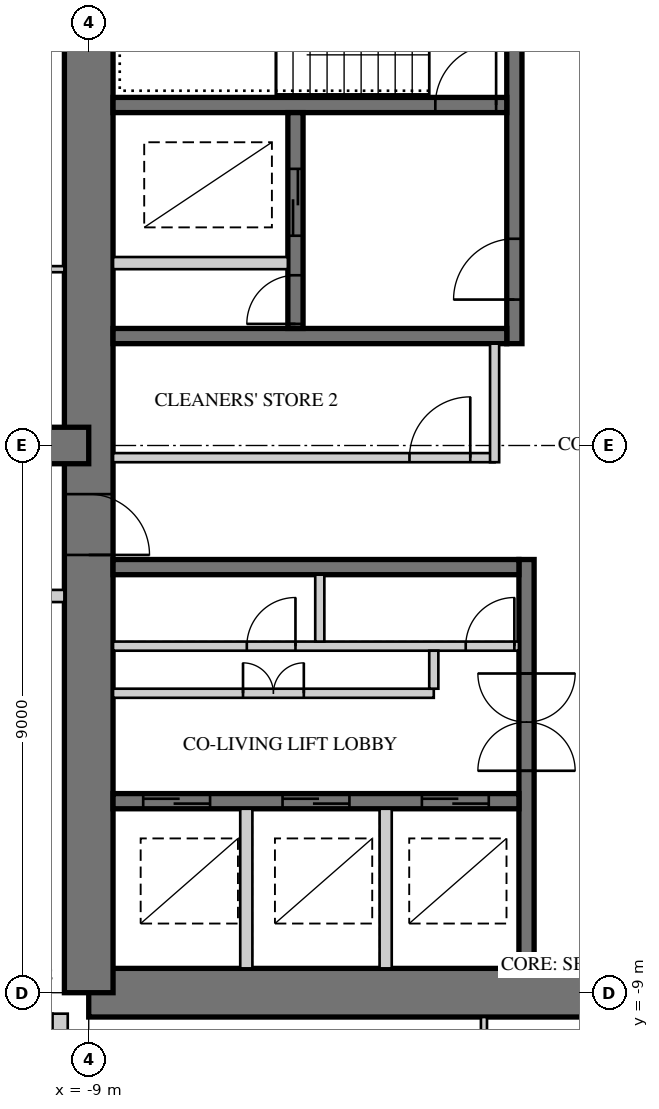
"""IFC4 building model, lengths in metres.
Left out: names, types, materials, properties, quantities, classifications, styles, units other than length and angle.
Written with IfcOpenShell. Run it as: python <this file> out.ifc"""

import sys

from ifc_helpers import new_model, si_unit, direction, frame, frame_2d, origin, place, context, subcontext, project, spatial, rectangle, extrude, element, fill, save


model = new_model("IFC4")
c1 = context("Model", 3, precision=1e-05, world=origin(), true_north=direction((0.0, 1.0)))
c2 = subcontext(c1, "Body", "Model", "MODEL_VIEW")
j1 = project(units=[si_unit("LENGTHUNIT", "METRE"), si_unit("PLANEANGLEUNIT", "RADIAN")], contexts=[c1])
p1 = place(None, origin())
s1 = spatial("IfcSite", under=j1, at=p1, CompositionType="ELEMENT")
p2 = place(p1, origin())
s2 = spatial("IfcBuilding", under=s1, at=p2, CompositionType="ELEMENT")
p3 = place(p2, frame((0.0, 0.0, 284.9)))
s3 = spatial("IfcBuildingStorey", under=s2, at=p3, CompositionType="ELEMENT", Elevation=284.9)
p4 = place(p3, frame((-9.0, -9.0, 0.0), z_axis=(0.0, 0.0, 1.0), x_axis=(1.0, 0.0, 0.0)))
e1 = element("IfcWall", 1, at=p4, inside=s3, PredefinedType="SHEAR", context=c2, shape_type="SweptSolid", body=[
    extrude(rectangle(XDim=18.0, YDim=0.8, at=frame_2d((9.0, 0.0))), origin(), (0.0, 0.0, 1.0), 3.4),
])
p5 = place(p4, frame((9.8, 0.0, 0.0)))
e2 = element("IfcOpeningElement", 2, at=p5, cuts=e1, PredefinedType="OPENING", context=c2, shape_type="SweptSolid", body=[
    extrude(rectangle(XDim=1.0, YDim=2.4, at=frame_2d((0.5, 1.2))), frame((0.0, 0.41, 0.0), z_axis=(0.0, -1.0, 0.0), x_axis=(1.0, 0.0, 0.0)), (0.0, 0.0, 1.0), 0.82),
])
p6 = place(p3, frame((-9.0, 9.0, 0.0), z_axis=(0.0, 0.0, 1.0), x_axis=(0.0, -1.0, 0.0)))
e3 = element("IfcWall", 3, at=p6, inside=s3, PredefinedType="SHEAR", context=c2, shape_type="SweptSolid", body=[
    extrude(rectangle(XDim=18.0, YDim=0.8, at=frame_2d((9.0, 0.0))), origin(), (0.0, 0.0, 1.0), 3.4),
])
p7 = place(p6, frame((9.8, 0.0, 0.0)))
e4 = element("IfcOpeningElement", 4, at=p7, cuts=e3, PredefinedType="OPENING", context=c2, shape_type="SweptSolid", body=[
    extrude(rectangle(XDim=1.0, YDim=2.4, at=frame_2d((0.5, 1.2))), frame((0.0, 0.41, 0.0), z_axis=(0.0, -1.0, 0.0), x_axis=(1.0, 0.0, 0.0)), (0.0, 0.0, 1.0), 0.82),
])
p8 = place(p3, frame((-2.0, 1.675, 0.0), z_axis=(0.0, 0.0, 1.0), x_axis=(0.0, 1.0, 0.0)))
e5 = element("IfcWall", 5, at=p8, inside=s3, PredefinedType="SHEAR", context=c2, shape_type="SweptSolid", body=[
    extrude(rectangle(XDim=6.925, YDim=0.25, at=frame_2d((3.462, 0.0))), origin(), (0.0, 0.0, 1.0), 3.4),
])
p9 = place(p8, frame((0.725, 0.0, 0.0)))
e6 = element("IfcOpeningElement", 6, at=p9, cuts=e5, PredefinedType="OPENING", context=c2, shape_type="SweptSolid", body=[
    extrude(rectangle(XDim=1.0, YDim=2.1, at=frame_2d((0.5, 1.05))), frame((0.0, 0.135, 0.0), z_axis=(0.0, -1.0, 0.0), x_axis=(1.0, 0.0, 0.0)), (0.0, 0.0, 1.0), 0.27),
])
p10 = place(p3, frame((-2.125, 1.8, 0.0), z_axis=(0.0, 0.0, 1.0), x_axis=(-1.0, 0.0, 0.0)))
e7 = element("IfcWall", 7, at=p10, inside=s3, PredefinedType="SHEAR", context=c2, shape_type="SweptSolid", body=[
    extrude(rectangle(XDim=6.475, YDim=0.25, at=frame_2d((3.238, 0.0))), origin(), (0.0, 0.0, 1.0), 3.4),
])
p11 = place(p3, frame((-2.125, 5.6, 0.0), z_axis=(0.0, 0.0, 1.0), x_axis=(-1.0, 0.0, 0.0)))
e8 = element("IfcWall", 8, at=p11, inside=s3, PredefinedType="SHEAR", context=c2, shape_type="SweptSolid", body=[
    extrude(rectangle(XDim=6.475, YDim=0.25, at=frame_2d((3.238, 0.0))), origin(), (0.0, 0.0, 1.0), 3.4),
])
p12 = place(p11, frame((0.175, 0.0, 0.0)))
e9 = element("IfcOpeningElement", 9, at=p12, cuts=e8, PredefinedType="OPENING", context=c2, shape_type="SweptSolid", body=[
    extrude(rectangle(XDim=1.0, YDim=2.1, at=frame_2d((0.5, 1.05))), frame((0.0, 0.135, 0.0), z_axis=(0.0, -1.0, 0.0), x_axis=(1.0, 0.0, 0.0)), (0.0, 0.0, 1.0), 0.27),
])
p13 = place(p3, frame((-5.6, 1.925, 0.0), z_axis=(0.0, 0.0, 1.0), x_axis=(0.0, 1.0, 0.0)))
e10 = element("IfcWall", 10, at=p13, inside=s3, PredefinedType="SHEAR", context=c2, shape_type="SweptSolid", body=[
    extrude(rectangle(XDim=3.55, YDim=0.25, at=frame_2d((1.775, 0.0))), origin(), (0.0, 0.0, 1.0), 3.4),
])
p14 = place(p13, frame((1.525, 0.0, 0.0)))
e11 = element("IfcOpeningElement", 11, at=p14, cuts=e10, PredefinedType="OPENING", context=c2, shape_type="SweptSolid", body=[
    extrude(rectangle(XDim=1.1, YDim=2.2, at=frame_2d((0.55, 1.1))), frame((0.0, 0.135, 0.0), z_axis=(0.0, -1.0, 0.0), x_axis=(1.0, 0.0, 0.0)), (0.0, 0.0, 1.0), 0.27),
])
p15 = place(p13, frame((0.075, 0.0, 0.0)))
e12 = element("IfcOpeningElement", 12, at=p15, cuts=e10, PredefinedType="OPENING", context=c2, shape_type="SweptSolid", body=[
    extrude(rectangle(XDim=0.8, YDim=2.1, at=frame_2d((0.4, 1.05))), frame((0.0, 0.135, 0.0), z_axis=(0.0, -1.0, 0.0), x_axis=(1.0, 0.0, 0.0)), (0.0, 0.0, 1.0), 0.27),
])
p16 = place(p3, frame((-5.725, 3.0, 0.0), z_axis=(0.0, 0.0, 1.0), x_axis=(-1.0, 0.0, 0.0)))
e13 = element("IfcWall", 13, at=p16, inside=s3, PredefinedType="PARTITIONING", context=c2, shape_type="SweptSolid", body=[
    extrude(rectangle(XDim=2.875, YDim=0.2, at=frame_2d((1.438, 0.0))), origin(), (0.0, 0.0, 1.0), 3.4),
])
p17 = place(p3, frame((-1.8, -1.875, 0.0), z_axis=(0.0, 0.0, 1.0), x_axis=(0.0, -1.0, 0.0)))
e14 = element("IfcWall", 14, at=p17, inside=s3, PredefinedType="SHEAR", context=c2, shape_type="SweptSolid", body=[
    extrude(rectangle(XDim=6.725, YDim=0.25, at=frame_2d((3.363, 0.0))), origin(), (0.0, 0.0, 1.0), 3.4),
])
p18 = place(p17, frame((1.875, 0.0, 0.0)))
e15 = element("IfcOpeningElement", 15, at=p18, cuts=e14, PredefinedType="OPENING", context=c2, shape_type="SweptSolid", body=[
    extrude(rectangle(XDim=1.6, YDim=2.4, at=frame_2d((0.8, 1.2))), frame((0.0, 0.135, 0.0), z_axis=(0.0, -1.0, 0.0), x_axis=(1.0, 0.0, 0.0)), (0.0, 0.0, 1.0), 0.27),
])
p19 = place(p3, frame((-1.925, -2.0, 0.0), z_axis=(0.0, 0.0, 1.0), x_axis=(-1.0, 0.0, 0.0)))
e16 = element("IfcWall", 16, at=p19, inside=s3, PredefinedType="SHEAR", context=c2, shape_type="SweptSolid", body=[
    extrude(rectangle(XDim=6.675, YDim=0.25, at=frame_2d((3.337, 0.0))), origin(), (0.0, 0.0, 1.0), 3.4),
])
p20 = place(p3, frame((-1.925, -5.85, 0.0), z_axis=(0.0, 0.0, 1.0), x_axis=(-1.0, 0.0, 0.0)))
e17 = element("IfcWall", 17, at=p20, inside=s3, PredefinedType="SHEAR", context=c2, shape_type="SweptSolid", body=[
    extrude(rectangle(XDim=6.675, YDim=0.25, at=frame_2d((3.337, 0.0))), origin(), (0.0, 0.0, 1.0), 3.4),
])
p21 = place(p20, frame((0.496, 0.0, 0.0)))
e18 = element("IfcOpeningElement", 18, at=p21, cuts=e17, PredefinedType="OPENING", context=c2, shape_type="SweptSolid", body=[
    extrude(rectangle(XDim=1.1, YDim=2.2, at=frame_2d((0.55, 1.1))), frame((0.0, 0.135, 0.0), z_axis=(0.0, -1.0, 0.0), x_axis=(1.0, 0.0, 0.0)), (0.0, 0.0, 1.0), 0.27),
])
p22 = place(p20, frame((2.788, 0.0, 0.0)))
e19 = element("IfcOpeningElement", 19, at=p22, cuts=e17, PredefinedType="OPENING", context=c2, shape_type="SweptSolid", body=[
    extrude(rectangle(XDim=1.1, YDim=2.2, at=frame_2d((0.55, 1.1))), frame((0.0, 0.135, 0.0), z_axis=(0.0, -1.0, 0.0), x_axis=(1.0, 0.0, 0.0)), (0.0, 0.0, 1.0), 0.27),
])
p23 = place(p20, frame((5.079, 0.0, 0.0)))
e20 = element("IfcOpeningElement", 20, at=p23, cuts=e17, PredefinedType="OPENING", context=c2, shape_type="SweptSolid", body=[
    extrude(rectangle(XDim=1.1, YDim=2.2, at=frame_2d((0.55, 1.1))), frame((0.0, 0.135, 0.0), z_axis=(0.0, -1.0, 0.0), x_axis=(1.0, 0.0, 0.0)), (0.0, 0.0, 1.0), 0.27),
])
p24 = place(p3, frame((-1.925, -3.3, 0.0), z_axis=(0.0, 0.0, 1.0), x_axis=(-1.0, 0.0, 0.0)))
e21 = element("IfcWall", 21, at=p24, inside=s3, PredefinedType="PARTITIONING", context=c2, shape_type="SweptSolid", body=[
    extrude(rectangle(XDim=6.675, YDim=0.15, at=frame_2d((3.337, 0.0))), origin(), (0.0, 0.0, 1.0), 3.4),
])
p25 = place(p24, frame((0.075, 0.0, 0.0)))
e22 = element("IfcOpeningElement", 22, at=p25, cuts=e21, PredefinedType="OPENING", context=c2, shape_type="SweptSolid", body=[
    extrude(rectangle(XDim=0.8, YDim=2.1, at=frame_2d((0.4, 1.05))), frame((0.0, 0.085, 0.0), z_axis=(0.0, -1.0, 0.0), x_axis=(1.0, 0.0, 0.0)), (0.0, 0.0, 1.0), 0.17),
])
p26 = place(p24, frame((3.675, 0.0, 0.0)))
e23 = element("IfcOpeningElement", 23, at=p26, cuts=e21, PredefinedType="OPENING", context=c2, shape_type="SweptSolid", body=[
    extrude(rectangle(XDim=0.8, YDim=2.1, at=frame_2d((0.4, 1.05))), frame((0.0, 0.085, 0.0), z_axis=(0.0, -1.0, 0.0), x_axis=(1.0, 0.0, 0.0)), (0.0, 0.0, 1.0), 0.17),
])
p27 = place(p3, frame((-5.2, -2.125, 0.0), z_axis=(0.0, 0.0, 1.0), x_axis=(0.0, -1.0, 0.0)))
e24 = element("IfcWall", 24, at=p27, inside=s3, PredefinedType="PARTITIONING", context=c2, shape_type="SweptSolid", body=[
    extrude(rectangle(XDim=1.1, YDim=0.15, at=frame_2d((0.55, 0.0))), origin(), (0.0, 0.0, 1.0), 3.4),
])
for number, where, z_axis, x_axis in (
    (25, (-4.117, -5.975, 0.0), (0.0, 0.0, 1.0), (0.0, -1.0, 0.0)),
    (26, (-6.408, -5.975, 0.0), (0.0, 0.0, 1.0), (0.0, -1.0, 0.0)),
):
    element("IfcWall", number, at=place(p3, frame(where, z_axis=z_axis, x_axis=x_axis)), inside=s3, PredefinedType="PARTITIONING", context=c2, shape_type="SweptSolid", body=[
        extrude(rectangle(XDim=2.625, YDim=0.2, at=frame_2d((1.312, 0.0))), origin(), (0.0, 0.0, 1.0), 3.4),
    ])
p28 = place(p3, frame((-9.0, 0.0, 0.0), z_axis=(0.0, 0.0, 1.0), x_axis=(-1.0, 0.0, 0.0)))
e27 = element("IfcWall", 27, at=p28, inside=s3, PredefinedType="SHEAR", context=c2, shape_type="SweptSolid", body=[
    extrude(rectangle(XDim=9.0, YDim=0.6, at=frame_2d((4.5, 0.0))), origin(), (0.0, 0.0, 1.0), 3.4),
])
p29 = place(p28, frame((3.8, 0.0, 0.0)))
e28 = element("IfcOpeningElement", 28, at=p29, cuts=e27, PredefinedType="OPENING", context=c2, shape_type="SweptSolid", body=[
    extrude(rectangle(XDim=1.0, YDim=2.15, at=frame_2d((0.5, 1.075))), frame((0.0, 0.31, 0.0), z_axis=(0.0, -1.0, 0.0), x_axis=(1.0, 0.0, 0.0)), (0.0, 0.0, 1.0), 0.62),
])
p30 = place(p28, frame((7.0, 0.0, 0.0)))
e29 = element("IfcOpeningElement", 29, at=p30, cuts=e27, PredefinedType="OPENING", context=c2, shape_type="SweptSolid", body=[
    extrude(rectangle(XDim=1.0, YDim=2.2, at=frame_2d((0.5, 1.1))), frame((0.0, 0.31, 0.0), z_axis=(0.0, -1.0, 0.0), x_axis=(1.0, 0.0, 0.0)), (0.0, 0.0, 1.0), 0.62),
])
p31 = place(p3, frame((-12.47, -9.47, 0.0), z_axis=(0.0, 0.0, 1.0), x_axis=(1.0, 0.0, 0.0)))
e30 = element("IfcWall", 30, at=p31, inside=s3, PredefinedType="SOLIDWALL", context=c2, shape_type="SweptSolid", body=[
    extrude(rectangle(XDim=2.875, YDim=0.25, at=frame_2d((1.438, 0.0))), origin(), (0.0, 0.0, 1.0), 3.2),
])
p32 = place(p31, frame((0.6, 0.0, 0.0)))
e31 = element("IfcOpeningElement", 31, at=p32, cuts=e30, PredefinedType="OPENING", context=c2, shape_type="SweptSolid", body=[
    extrude(rectangle(XDim=1.0, YDim=2.2, at=frame_2d((0.5, 1.1))), frame((0.0, 0.135, 0.0), z_axis=(0.0, -1.0, 0.0), x_axis=(1.0, 0.0, 0.0)), (0.0, 0.0, 1.0), 0.27),
])
p33 = place(p3, frame((-9.47, -9.345, 0.0), z_axis=(0.0, 0.0, 1.0), x_axis=(0.0, -1.0, 0.0)))
e32 = element("IfcWall", 32, at=p33, inside=s3, PredefinedType="SOLIDWALL", context=c2, shape_type="SweptSolid", body=[
    extrude(rectangle(XDim=3.125, YDim=0.25, at=frame_2d((1.562, 0.0))), origin(), (0.0, 0.0, 1.0), 3.2),
])
p34 = place(p33, frame((0.6, 0.0, 0.0)))
e33 = element("IfcOpeningElement", 33, at=p34, cuts=e32, PredefinedType="OPENING", context=c2, shape_type="SweptSolid", body=[
    extrude(rectangle(XDim=1.0, YDim=2.2, at=frame_2d((0.5, 1.1))), frame((0.0, 0.135, 0.0), z_axis=(0.0, -1.0, 0.0), x_axis=(1.0, 0.0, 0.0)), (0.0, 0.0, 1.0), 0.27),
])
p35 = place(p3, frame((-2.325, -0.2, 0.0), z_axis=(0.0, 0.0, 1.0), x_axis=(-1.0, 0.0, 0.0)))
e34 = element("IfcWall", 34, at=p35, inside=s3, PredefinedType="PARTITIONING", context=c2, shape_type="SweptSolid", body=[
    extrude(rectangle(XDim=6.275, YDim=0.15, at=frame_2d((3.138, 0.0))), origin(), (0.0, 0.0, 1.0), 3.2),
])
p36 = place(p35, frame((0.4, 0.0, 0.0)))
e35 = element("IfcOpeningElement", 35, at=p36, cuts=e34, PredefinedType="OPENING", context=c2, shape_type="SweptSolid", body=[
    extrude(rectangle(XDim=1.0, YDim=2.1, at=frame_2d((0.5, 1.05))), frame((0.0, 0.085, 0.0), z_axis=(0.0, -1.0, 0.0), x_axis=(1.0, 0.0, 0.0)), (0.0, 0.0, 1.0), 0.17),
])
p37 = place(p3, frame((-2.325, 1.675, 0.0), z_axis=(0.0, 0.0, 1.0), x_axis=(0.0, -1.0, 0.0)))
e36 = element("IfcWall", 36, at=p37, inside=s3, PredefinedType="PARTITIONING", context=c2, shape_type="SweptSolid", body=[
    extrude(rectangle(XDim=1.95, YDim=0.15, at=frame_2d((0.975, 0.0))), origin(), (0.0, 0.0, 1.0), 3.2),
])
p38 = place(p3, frame((-3.325, -4.075, 0.0), z_axis=(0.0, 0.0, 1.0), x_axis=(-1.0, 0.0, 0.0)))
e37 = element("IfcWall", 37, at=p38, inside=s3, PredefinedType="PARTITIONING", context=c2, shape_type="SweptSolid", body=[
    extrude(rectangle(XDim=5.275, YDim=0.15, at=frame_2d((2.638, 0.0))), origin(), (0.0, 0.0, 1.0), 3.2),
])
p39 = place(p38, frame((2.137, 0.0, 0.0)))
e38 = element("IfcOpeningElement", 38, at=p39, cuts=e37, PredefinedType="OPENING", context=c2, shape_type="SweptSolid", body=[
    extrude(rectangle(XDim=1.0, YDim=2.1, at=frame_2d((0.5, 1.05))), frame((0.0, 0.085, 0.0), z_axis=(0.0, -1.0, 0.0), x_axis=(1.0, 0.0, 0.0)), (0.0, 0.0, 1.0), 0.17),
])
p40 = place(p3, frame((-3.325, -3.375, 0.0), z_axis=(0.0, 0.0, 1.0), x_axis=(0.0, -1.0, 0.0)))
e39 = element("IfcWall", 39, at=p40, inside=s3, PredefinedType="PARTITIONING", context=c2, shape_type="SweptSolid", body=[
    extrude(rectangle(XDim=0.625, YDim=0.15, at=frame_2d((0.312, 0.0))), origin(), (0.0, 0.0, 1.0), 3.2),
])
p41 = place(p3, frame((-2.5, -9.4, 0.0), z_axis=(0.0, 0.0, 1.0), x_axis=(0.0, -1.0, 0.0)))
e40 = element("IfcWall", 40, at=p41, inside=s3, PredefinedType="PARTITIONING", context=c2, shape_type="SweptSolid", body=[
    extrude(rectangle(XDim=2.65, YDim=0.1, at=frame_2d((1.325, 0.0))), origin(), (0.0, 0.0, 1.0), 3.2),
])
p42 = place(p3, frame((-9.4, 2.9, 0.0), z_axis=(0.0, 0.0, 1.0), x_axis=(-1.0, 0.0, 0.0)))
e41 = element("IfcWall", 41, at=p42, inside=s3, PredefinedType="PARTITIONING", context=c2, shape_type="SweptSolid", body=[
    extrude(rectangle(XDim=2.85, YDim=0.1, at=frame_2d((1.425, 0.0))), origin(), (0.0, 0.0, 1.0), 3.2),
])
p43 = place(p3, frame((-9.4, -2.475, 0.0), z_axis=(0.0, 0.0, 1.0), x_axis=(-1.0, 0.0, 0.0)))
e42 = element("IfcWall", 42, at=p43, inside=s3, PredefinedType="SOLIDWALL", context=c2, shape_type="SweptSolid", body=[
    extrude(rectangle(XDim=5.6, YDim=0.2, at=frame_2d((2.8, 0.0))), origin(), (0.0, 0.0, 1.0), 3.2),
])
p44 = place(p43, frame((1.2, 0.0, 0.0)))
e43 = element("IfcOpeningElement", 43, at=p44, cuts=e42, PredefinedType="OPENING", context=c2, shape_type="SweptSolid", body=[
    extrude(rectangle(XDim=1.0, YDim=2.2, at=frame_2d((0.5, 1.1))), frame((0.0, 0.11, 0.0), z_axis=(0.0, -1.0, 0.0), x_axis=(1.0, 0.0, 0.0)), (0.0, 0.0, 1.0), 0.22),
])
p45 = place(p36, frame((1.0, 0.0, 0.0), z_axis=(0.0, 0.0, 1.0), x_axis=(-1.0, 0.0, 0.0)))
e44 = element("IfcDoor", 44, at=p45, inside=s3, OperationType="SINGLE_SWING_RIGHT", PredefinedType="DOOR", context=c2, shape_type="SweptSolid", body=[
    extrude(rectangle(XDim=1.0, YDim=2.1, at=frame_2d((0.5, 1.05))), frame((0.0, 0.025, 0.0), z_axis=(0.0, -1.0, 0.0), x_axis=(1.0, 0.0, 0.0)), (0.0, 0.0, 1.0), 0.05),
])
fill(e35, e44)
p46 = place(p39, frame((1.0, 0.0, 0.0), z_axis=(0.0, 0.0, 1.0), x_axis=(-1.0, 0.0, 0.0)))
e45 = element("IfcDoor", 45, at=p46, inside=s3, OperationType="DOUBLE_DOOR_SINGLE_SWING", PredefinedType="DOOR", context=c2, shape_type="SweptSolid", body=[
    extrude(rectangle(XDim=1.0, YDim=2.1, at=frame_2d((0.5, 1.05))), frame((0.0, 0.025, 0.0), z_axis=(0.0, -1.0, 0.0), x_axis=(1.0, 0.0, 0.0)), (0.0, 0.0, 1.0), 0.05),
])
fill(e38, e45)
p47 = place(p7, origin())
e46 = element("IfcDoor", 46, at=p47, inside=s3, OperationType="SINGLE_SWING_RIGHT", PredefinedType="DOOR", context=c2, shape_type="SweptSolid", body=[
    extrude(rectangle(XDim=1.0, YDim=2.4, at=frame_2d((0.5, 1.2))), frame((0.0, 0.055, 0.0), z_axis=(0.0, -1.0, 0.0), x_axis=(1.0, 0.0, 0.0)), (0.0, 0.0, 1.0), 0.05),
])
fill(e4, e46)
p48 = place(p9, origin())
e47 = element("IfcDoor", 47, at=p48, inside=s3, OperationType="SINGLE_SWING_LEFT", PredefinedType="DOOR", context=c2, shape_type="SweptSolid", body=[
    extrude(rectangle(XDim=1.0, YDim=2.1, at=frame_2d((0.5, 1.05))), frame((0.0, 0.025, 0.0), z_axis=(0.0, -1.0, 0.0), x_axis=(1.0, 0.0, 0.0)), (0.0, 0.0, 1.0), 0.05),
])
fill(e6, e47)
p49 = place(p12, frame((1.0, 0.0, 0.0), z_axis=(0.0, 0.0, 1.0), x_axis=(-1.0, 0.0, 0.0)))
e48 = element("IfcDoor", 48, at=p49, inside=s3, OperationType="SINGLE_SWING_RIGHT", PredefinedType="DOOR", context=c2, shape_type="SweptSolid", body=[
    extrude(rectangle(XDim=1.0, YDim=2.1, at=frame_2d((0.5, 1.05))), frame((0.0, 0.025, 0.0), z_axis=(0.0, -1.0, 0.0), x_axis=(1.0, 0.0, 0.0)), (0.0, 0.0, 1.0), 0.05),
])
fill(e9, e48)
p50 = place(p14, origin())
e49 = element("IfcDoor", 49, at=p50, inside=s3, OperationType="DOUBLE_DOOR_SLIDING", PredefinedType="DOOR", context=c2, shape_type="SweptSolid", body=[
    extrude(rectangle(XDim=1.1, YDim=2.2, at=frame_2d((0.55, 1.1))), frame((0.0, 0.025, 0.0), z_axis=(0.0, -1.0, 0.0), x_axis=(1.0, 0.0, 0.0)), (0.0, 0.0, 1.0), 0.05),
])
fill(e11, e49)
p51 = place(p15, origin())
e50 = element("IfcDoor", 50, at=p51, inside=s3, OperationType="SINGLE_SWING_LEFT", PredefinedType="DOOR", context=c2, shape_type="SweptSolid", body=[
    extrude(rectangle(XDim=0.8, YDim=2.1, at=frame_2d((0.4, 1.05))), frame((0.0, 0.025, 0.0), z_axis=(0.0, -1.0, 0.0), x_axis=(1.0, 0.0, 0.0)), (0.0, 0.0, 1.0), 0.05),
])
fill(e12, e50)
p52 = place(p21, origin())
e51 = element("IfcDoor", 51, at=p52, inside=s3, OperationType="DOUBLE_DOOR_SLIDING", PredefinedType="DOOR", context=c2, shape_type="SweptSolid", body=[
    extrude(rectangle(XDim=1.1, YDim=2.2, at=frame_2d((0.55, 1.1))), frame((0.0, 0.025, 0.0), z_axis=(0.0, -1.0, 0.0), x_axis=(1.0, 0.0, 0.0)), (0.0, 0.0, 1.0), 0.05),
])
fill(e18, e51)
p53 = place(p22, origin())
e52 = element("IfcDoor", 52, at=p53, inside=s3, OperationType="DOUBLE_DOOR_SLIDING", PredefinedType="DOOR", context=c2, shape_type="SweptSolid", body=[
    extrude(rectangle(XDim=1.1, YDim=2.2, at=frame_2d((0.55, 1.1))), frame((0.0, 0.025, 0.0), z_axis=(0.0, -1.0, 0.0), x_axis=(1.0, 0.0, 0.0)), (0.0, 0.0, 1.0), 0.05),
])
fill(e19, e52)
p54 = place(p23, origin())
e53 = element("IfcDoor", 53, at=p54, inside=s3, OperationType="DOUBLE_DOOR_SLIDING", PredefinedType="DOOR", context=c2, shape_type="SweptSolid", body=[
    extrude(rectangle(XDim=1.1, YDim=2.2, at=frame_2d((0.55, 1.1))), frame((0.0, 0.025, 0.0), z_axis=(0.0, -1.0, 0.0), x_axis=(1.0, 0.0, 0.0)), (0.0, 0.0, 1.0), 0.05),
])
fill(e20, e53)
p55 = place(p18, origin())
e54 = element("IfcDoor", 54, at=p55, inside=s3, OperationType="DOUBLE_DOOR_DOUBLE_SWING", PredefinedType="DOOR", context=c2, shape_type="SweptSolid", body=[
    extrude(rectangle(XDim=1.6, YDim=2.4, at=frame_2d((0.8, 1.2))), frame((0.0, 0.025, 0.0), z_axis=(0.0, -1.0, 0.0), x_axis=(1.0, 0.0, 0.0)), (0.0, 0.0, 1.0), 0.05),
])
fill(e15, e54)
p56 = place(p25, frame((0.8, 0.0, 0.0), z_axis=(0.0, 0.0, 1.0), x_axis=(-1.0, 0.0, 0.0)))
e55 = element("IfcDoor", 55, at=p56, inside=s3, OperationType="SINGLE_SWING_RIGHT", PredefinedType="DOOR", context=c2, shape_type="SweptSolid", body=[
    extrude(rectangle(XDim=0.8, YDim=2.1, at=frame_2d((0.4, 1.05))), frame((0.0, 0.025, 0.0), z_axis=(0.0, -1.0, 0.0), x_axis=(1.0, 0.0, 0.0)), (0.0, 0.0, 1.0), 0.05),
])
fill(e22, e55)
p57 = place(p26, frame((0.8, 0.0, 0.0), z_axis=(0.0, 0.0, 1.0), x_axis=(-1.0, 0.0, 0.0)))
e56 = element("IfcDoor", 56, at=p57, inside=s3, OperationType="SINGLE_SWING_RIGHT", PredefinedType="DOOR", context=c2, shape_type="SweptSolid", body=[
    extrude(rectangle(XDim=0.8, YDim=2.1, at=frame_2d((0.4, 1.05))), frame((0.0, 0.025, 0.0), z_axis=(0.0, -1.0, 0.0), x_axis=(1.0, 0.0, 0.0)), (0.0, 0.0, 1.0), 0.05),
])
fill(e23, e56)
save(model, sys.argv[1])
